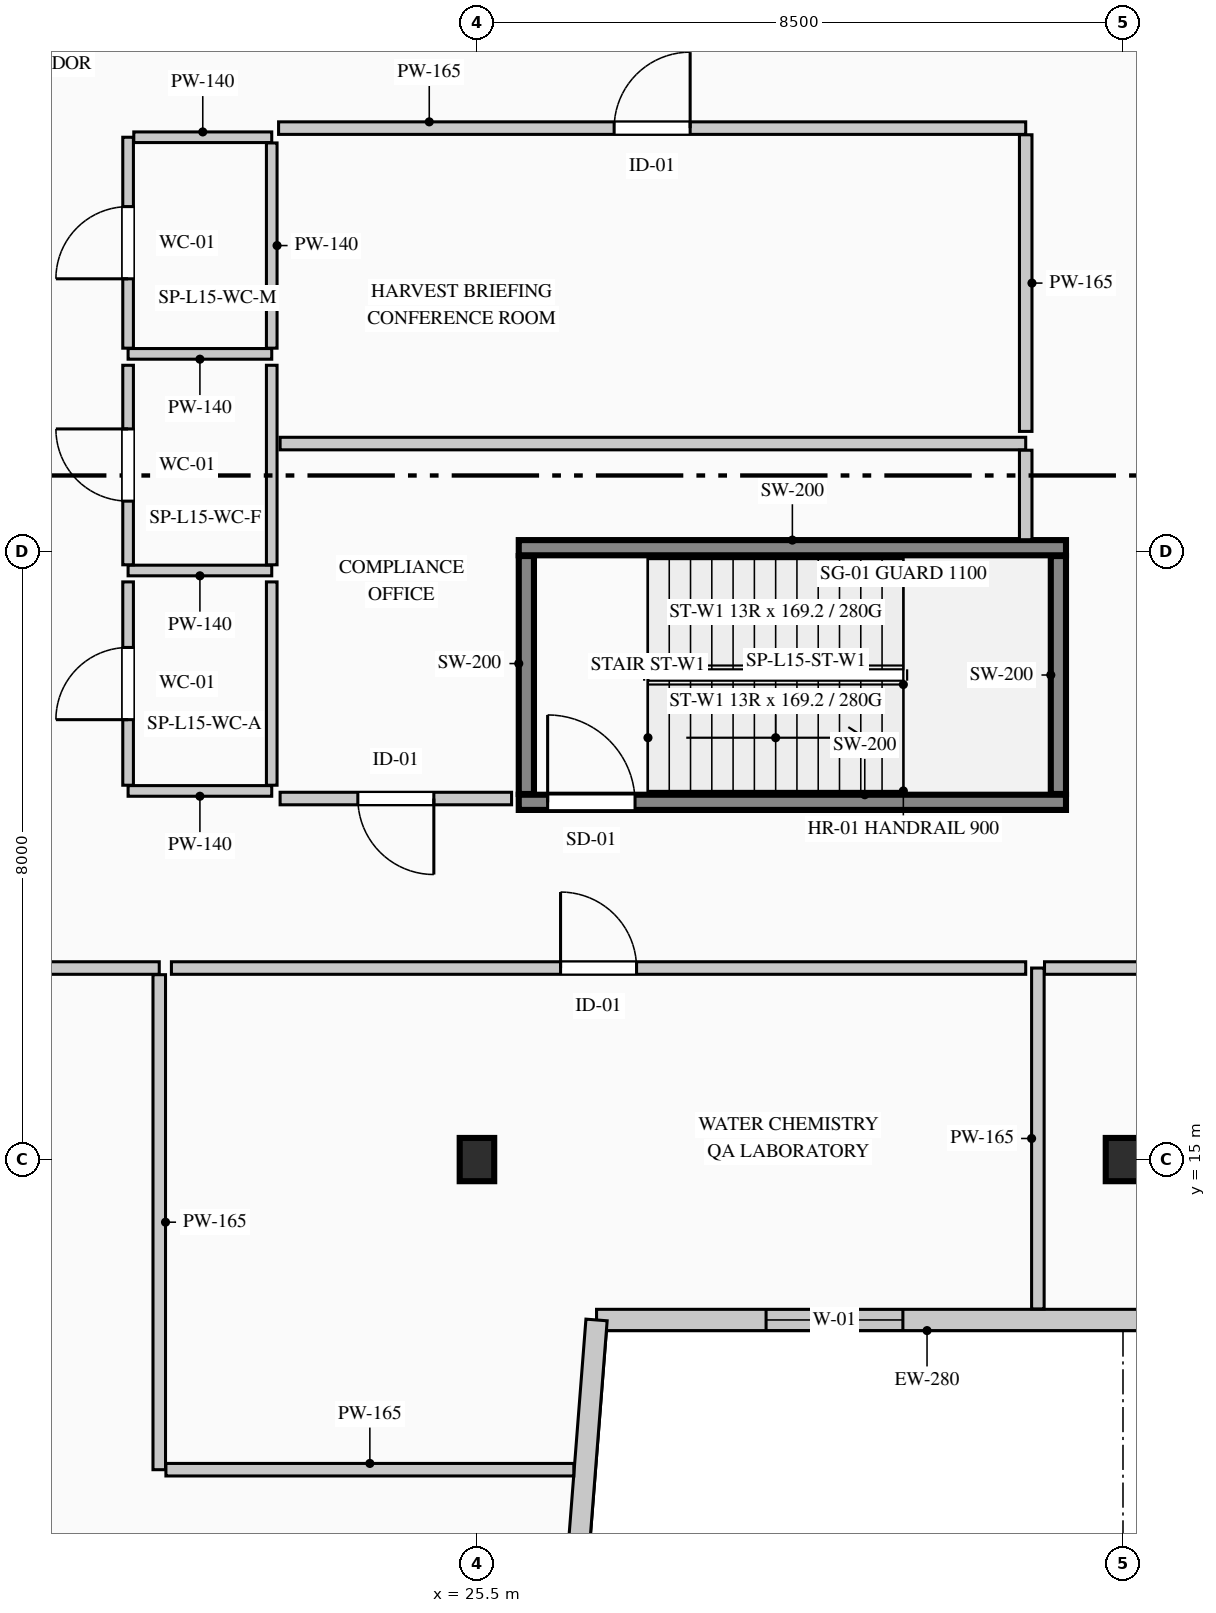
"""IFC4 building model, lengths in metres.
Left out: names, types, materials, properties, quantities, classifications, styles, units other than length and angle.
Written with IfcOpenShell. Run it as: python <this file> out.ifc"""

import sys

from ifc_helpers import new_model, si_unit, direction, frame, frame_2d, origin, origin_2d, place, context, subcontext, project, spatial, rectangle, i_section, extrude, element, fill, save


model = new_model("IFC4")
c1 = context("Model", 3, precision=1e-05, world=origin(), true_north=direction((0.0, 1.0)))
c2 = subcontext(c1, "Body", "Model", "MODEL_VIEW")
j1 = project(units=[si_unit("LENGTHUNIT", "METRE"), si_unit("PLANEANGLEUNIT", "RADIAN")], contexts=[c1])
p1 = place(None, origin())
s1 = spatial("IfcSite", under=j1, at=p1, CompositionType="ELEMENT")
p2 = place(p1, origin())
s2 = spatial("IfcBuilding", under=s1, at=p2, CompositionType="ELEMENT")
p3 = place(p2, frame((0.0, 0.0, 66.6)))
s3 = spatial("IfcBuildingStorey", under=s2, at=p3, CompositionType="ELEMENT", Elevation=66.6)
p4 = place(p3, frame((26.05, 19.7, 0.0), z_axis=(0.0, 0.0, 1.0), x_axis=(1.0, 0.0, 0.0)))
e1 = element("IfcWall", 1, at=p4, inside=s3, PredefinedType="SHEAR", context=c2, shape_type="SweptSolid", body=[
    extrude(rectangle(XDim=7.2, YDim=0.2, at=frame_2d((3.6, 0.0))), origin(), (0.0, 0.0, 1.0), 4.4),
])
p5 = place(p4, frame((0.38, 0.0, 0.0)))
e2 = element("IfcOpeningElement", 2, at=p5, cuts=e1, PredefinedType="OPENING", context=c2, shape_type="SweptSolid", body=[
    extrude(rectangle(XDim=1.15, YDim=2.2, at=frame_2d((0.575, 1.1))), frame((0.0, 0.11, 0.0), z_axis=(0.0, -1.0, 0.0), x_axis=(1.0, 0.0, 0.0)), (0.0, 0.0, 1.0), 0.22),
])
p6 = place(p3, frame((26.05, 23.05, 0.0), z_axis=(0.0, 0.0, 1.0), x_axis=(1.0, 0.0, 0.0)))
e3 = element("IfcWall", 3, at=p6, inside=s3, PredefinedType="SHEAR", context=c2, shape_type="SweptSolid", body=[
    extrude(rectangle(XDim=7.2, YDim=0.2, at=frame_2d((3.6, 0.0))), origin(), (0.0, 0.0, 1.0), 4.4),
])
for number, where, z_axis, x_axis in (
    (4, (26.15, 19.81, 0.0), (0.0, 0.0, 1.0), (0.0, 1.0, 0.0)),
    (5, (33.15, 19.81, 0.0), (0.0, 0.0, 1.0), (0.0, 1.0, 0.0)),
):
    element("IfcWall", number, at=place(p3, frame(where, z_axis=z_axis, x_axis=x_axis)), inside=s3, PredefinedType="SHEAR", context=c2, shape_type="SweptSolid", body=[
        extrude(rectangle(XDim=3.13, YDim=0.2, at=frame_2d((1.565, 0.0))), origin(), (0.0, 0.0, 1.0), 4.4),
    ])
for number, where, z_axis, x_axis in (
    (6, (25.5, 15.0, 0.0), (0.0, 0.0, 1.0), (1.0, 0.0, 0.0)),
    (7, (34.0, 15.0, 0.0), (0.0, 0.0, 1.0), (1.0, 0.0, 0.0)),
):
    element("IfcColumn", number, at=place(p3, frame(where, z_axis=z_axis, x_axis=x_axis)), inside=s3, PredefinedType="COLUMN", context=c2, shape_type="SweptSolid", body=[
        extrude(i_section(OverallWidth=0.454, OverallDepth=0.569, WebThickness=0.078, FlangeThickness=0.08, FilletRadius=0.015, at=origin_2d()), origin(), (0.0, 0.0, 1.0), 4.4),
    ])
p7 = place(p3, frame((35.77, 12.89, 0.0), z_axis=(0.0, 0.0, 1.0), x_axis=(-1.0, 0.0, 0.0)))
e8 = element("IfcWall", 8, at=p7, inside=s3, PredefinedType="STANDARD", context=c2, shape_type="SweptSolid", body=[
    extrude(rectangle(XDim=8.697, YDim=0.28, at=frame_2d((4.348, 0.0))), origin(), (0.0, 0.0, 1.0), 4.1),
])
p8 = place(p7, frame((4.666, 0.0, 0.9)))
e9 = element("IfcOpeningElement", 9, at=p8, cuts=e8, PredefinedType="OPENING", context=c2, shape_type="SweptSolid", body=[
    extrude(rectangle(XDim=1.8, YDim=2.1, at=frame_2d((0.9, 1.05))), frame((0.0, 0.15, 0.0), z_axis=(0.0, -1.0, 0.0), x_axis=(1.0, 0.0, 0.0)), (0.0, 0.0, 1.0), 0.3),
])
p9 = place(p3, frame((27.073, 12.89, 0.0), z_axis=(0.0, 0.0, 1.0), x_axis=(-0.077816860153, -0.996967670627, 0.0)))
e10 = element("IfcWall", 10, at=p9, inside=s3, PredefinedType="STANDARD", context=c2, shape_type="SweptSolid", body=[
    extrude(rectangle(XDim=10.281, YDim=0.28, at=frame_2d((5.141, 0.0))), origin(), (0.0, 0.0, 1.0), 4.1),
])
p10 = place(p3, frame((22.8, 25.6, 0.0), z_axis=(0.0, 0.0, 1.0), x_axis=(-1.0, 0.0, 0.0)))
e11 = element("IfcWall", 11, at=p10, inside=s3, PredefinedType="PARTITIONING", context=c2, shape_type="SweptSolid", body=[
    extrude(rectangle(XDim=1.89, YDim=0.14, at=frame_2d((0.945, 0.0))), origin(), (0.0, 0.0, 1.0), 4.1),
])
p11 = place(p3, frame((20.91, 25.675, 0.0), z_axis=(0.0, 0.0, 1.0), x_axis=(0.0, 1.0, 0.0)))
e12 = element("IfcWall", 12, at=p11, inside=s3, PredefinedType="PARTITIONING", context=c2, shape_type="SweptSolid", body=[
    extrude(rectangle(XDim=2.775, YDim=0.14, at=frame_2d((1.387, 0.0))), origin(), (0.0, 0.0, 1.0), 4.1),
])
p12 = place(p11, frame((0.913, 0.0, 0.0)))
e13 = element("IfcOpeningElement", 13, at=p12, cuts=e12, PredefinedType="OPENING", context=c2, shape_type="SweptSolid", body=[
    extrude(rectangle(XDim=0.95, YDim=2.15, at=frame_2d((0.475, 1.075))), frame((0.0, 0.08, 0.0), z_axis=(0.0, -1.0, 0.0), x_axis=(1.0, 0.0, 0.0)), (0.0, 0.0, 1.0), 0.16),
])
p13 = place(p3, frame((20.985, 28.45, 0.0), z_axis=(0.0, 0.0, 1.0), x_axis=(1.0, 0.0, 0.0)))
e14 = element("IfcWall", 14, at=p13, inside=s3, PredefinedType="PARTITIONING", context=c2, shape_type="SweptSolid", body=[
    extrude(rectangle(XDim=1.815, YDim=0.14, at=frame_2d((0.907, 0.0))), origin(), (0.0, 0.0, 1.0), 4.1),
])
p14 = place(p3, frame((22.8, 28.375, 0.0), z_axis=(0.0, 0.0, 1.0), x_axis=(0.0, -1.0, 0.0)))
e15 = element("IfcWall", 15, at=p14, inside=s3, PredefinedType="PARTITIONING", context=c2, shape_type="SweptSolid", body=[
    extrude(rectangle(XDim=2.7, YDim=0.14, at=frame_2d((1.35, 0.0))), origin(), (0.0, 0.0, 1.0), 3.725),
])
p15 = place(p3, frame((22.8, 22.75, 0.0), z_axis=(0.0, 0.0, 1.0), x_axis=(-1.0, 0.0, 0.0)))
e16 = element("IfcWall", 16, at=p15, inside=s3, PredefinedType="PARTITIONING", context=c2, shape_type="SweptSolid", body=[
    extrude(rectangle(XDim=1.89, YDim=0.14, at=frame_2d((0.945, 0.0))), origin(), (0.0, 0.0, 1.0), 4.1),
])
p16 = place(p3, frame((20.91, 22.825, 0.0), z_axis=(0.0, 0.0, 1.0), x_axis=(0.0, 1.0, 0.0)))
e17 = element("IfcWall", 17, at=p16, inside=s3, PredefinedType="PARTITIONING", context=c2, shape_type="SweptSolid", body=[
    extrude(rectangle(XDim=2.625, YDim=0.14, at=frame_2d((1.312, 0.0))), origin(), (0.0, 0.0, 1.0), 4.1),
])
p17 = place(p16, frame((0.837, 0.0, 0.0)))
e18 = element("IfcOpeningElement", 18, at=p17, cuts=e17, PredefinedType="OPENING", context=c2, shape_type="SweptSolid", body=[
    extrude(rectangle(XDim=0.95, YDim=2.15, at=frame_2d((0.475, 1.075))), frame((0.0, 0.08, 0.0), z_axis=(0.0, -1.0, 0.0), x_axis=(1.0, 0.0, 0.0)), (0.0, 0.0, 1.0), 0.16),
])
p18 = place(p3, frame((22.8, 25.45, 0.0), z_axis=(0.0, 0.0, 1.0), x_axis=(0.0, -1.0, 0.0)))
e19 = element("IfcWall", 19, at=p18, inside=s3, PredefinedType="PARTITIONING", context=c2, shape_type="SweptSolid", body=[
    extrude(rectangle(XDim=2.625, YDim=0.14, at=frame_2d((1.312, 0.0))), origin(), (0.0, 0.0, 1.0), 3.725),
])
p19 = place(p3, frame((22.8, 19.85, 0.0), z_axis=(0.0, 0.0, 1.0), x_axis=(-1.0, 0.0, 0.0)))
e20 = element("IfcWall", 20, at=p19, inside=s3, PredefinedType="PARTITIONING", context=c2, shape_type="SweptSolid", body=[
    extrude(rectangle(XDim=1.89, YDim=0.14, at=frame_2d((0.945, 0.0))), origin(), (0.0, 0.0, 1.0), 4.1),
])
p20 = place(p3, frame((20.91, 19.925, 0.0), z_axis=(0.0, 0.0, 1.0), x_axis=(0.0, 1.0, 0.0)))
e21 = element("IfcWall", 21, at=p20, inside=s3, PredefinedType="PARTITIONING", context=c2, shape_type="SweptSolid", body=[
    extrude(rectangle(XDim=2.675, YDim=0.14, at=frame_2d((1.337, 0.0))), origin(), (0.0, 0.0, 1.0), 4.1),
])
p21 = place(p20, frame((0.863, 0.0, 0.0)))
e22 = element("IfcOpeningElement", 22, at=p21, cuts=e21, PredefinedType="OPENING", context=c2, shape_type="SweptSolid", body=[
    extrude(rectangle(XDim=0.95, YDim=2.15, at=frame_2d((0.475, 1.075))), frame((0.0, 0.08, 0.0), z_axis=(0.0, -1.0, 0.0), x_axis=(1.0, 0.0, 0.0)), (0.0, 0.0, 1.0), 0.16),
])
p22 = place(p3, frame((22.8, 22.6, 0.0), z_axis=(0.0, 0.0, 1.0), x_axis=(0.0, -1.0, 0.0)))
e23 = element("IfcWall", 23, at=p22, inside=s3, PredefinedType="PARTITIONING", context=c2, shape_type="SweptSolid", body=[
    extrude(rectangle(XDim=2.675, YDim=0.14, at=frame_2d((1.337, 0.0))), origin(), (0.0, 0.0, 1.0), 3.725),
])
p23 = place(p3, frame((11.88, 17.52, 0.0), z_axis=(0.0, 0.0, 1.0), x_axis=(1.0, 0.0, 0.0)))
e24 = element("IfcWall", 24, at=p23, inside=s3, PredefinedType="PARTITIONING", context=c2, shape_type="SweptSolid", body=[
    extrude(rectangle(XDim=9.44, YDim=0.165, at=frame_2d((4.72, 0.0))), origin(), (0.0, 0.0, 1.0), 4.1),
])
p24 = place(p23, frame((4.22, 0.0, 0.0)))
e25 = element("IfcOpeningElement", 25, at=p24, cuts=e24, PredefinedType="OPENING", context=c2, shape_type="SweptSolid", body=[
    extrude(rectangle(XDim=1.0, YDim=2.15, at=frame_2d((0.5, 1.075))), frame((0.0, 0.093, 0.0), z_axis=(0.0, -1.0, 0.0), x_axis=(1.0, 0.0, 0.0)), (0.0, 0.0, 1.0), 0.185),
])
p25 = place(p3, frame((21.32, 17.433, 0.0), z_axis=(0.0, 0.0, 1.0), x_axis=(0.0, -1.0, 0.0)))
e26 = element("IfcWall", 26, at=p25, inside=s3, PredefinedType="PARTITIONING", context=c2, shape_type="SweptSolid", body=[
    extrude(rectangle(XDim=6.513, YDim=0.165, at=frame_2d((3.256, 0.0))), origin(), (0.0, 0.0, 1.0), 3.725),
])
p26 = place(p3, frame((21.407, 10.92, 0.0), z_axis=(0.0, 0.0, 1.0), x_axis=(1.0, 0.0, 0.0)))
e27 = element("IfcWall", 27, at=p26, inside=s3, PredefinedType="PARTITIONING", context=c2, shape_type="SweptSolid", body=[
    extrude(rectangle(XDim=5.367, YDim=0.165, at=frame_2d((2.684, 0.0))), origin(), (0.0, 0.0, 1.0), 4.1),
])
p27 = place(p3, frame((32.88, 13.035, 0.0), z_axis=(0.0, 0.0, 1.0), x_axis=(0.0, 1.0, 0.0)))
e28 = element("IfcWall", 28, at=p27, inside=s3, PredefinedType="PARTITIONING", context=c2, shape_type="SweptSolid", body=[
    extrude(rectangle(XDim=4.485, YDim=0.165, at=frame_2d((2.243, 0.0))), origin(), (0.0, 0.0, 1.0), 4.1),
])
p28 = place(p3, frame((32.968, 17.52, 0.0), z_axis=(0.0, 0.0, 1.0), x_axis=(1.0, 0.0, 0.0)))
e29 = element("IfcWall", 29, at=p28, inside=s3, PredefinedType="PARTITIONING", context=c2, shape_type="SweptSolid", body=[
    extrude(rectangle(XDim=12.012, YDim=0.165, at=frame_2d((6.006, 0.0))), origin(), (0.0, 0.0, 1.0), 3.885),
])
p29 = place(p28, frame((5.506, 0.0, 0.0)))
e30 = element("IfcOpeningElement", 30, at=p29, cuts=e29, PredefinedType="OPENING", context=c2, shape_type="SweptSolid", body=[
    extrude(rectangle(XDim=1.0, YDim=2.15, at=frame_2d((0.5, 1.075))), frame((0.0, 0.093, 0.0), z_axis=(0.0, -1.0, 0.0), x_axis=(1.0, 0.0, 0.0)), (0.0, 0.0, 1.0), 0.185),
])
p30 = place(p3, frame((21.48, 17.52, 0.0), z_axis=(0.0, 0.0, 1.0), x_axis=(1.0, 0.0, 0.0)))
e31 = element("IfcWall", 31, at=p30, inside=s3, PredefinedType="PARTITIONING", context=c2, shape_type="SweptSolid", body=[
    extrude(rectangle(XDim=11.24, YDim=0.165, at=frame_2d((5.62, 0.0))), origin(), (0.0, 0.0, 1.0), 3.885),
])
p31 = place(p30, frame((5.12, 0.0, 0.0)))
e32 = element("IfcOpeningElement", 32, at=p31, cuts=e31, PredefinedType="OPENING", context=c2, shape_type="SweptSolid", body=[
    extrude(rectangle(XDim=1.0, YDim=2.15, at=frame_2d((0.5, 1.075))), frame((0.0, 0.093, 0.0), z_axis=(0.0, -1.0, 0.0), x_axis=(1.0, 0.0, 0.0)), (0.0, 0.0, 1.0), 0.185),
])
p32 = place(p3, frame((25.956, 19.75, 0.0), z_axis=(0.0, 0.0, 1.0), x_axis=(-1.0, 0.0, 0.0)))
e33 = element("IfcWall", 33, at=p32, inside=s3, PredefinedType="PARTITIONING", context=c2, shape_type="SweptSolid", body=[
    extrude(rectangle(XDim=3.046, YDim=0.165, at=frame_2d((1.523, 0.0))), origin(), (0.0, 0.0, 1.0), 4.1),
])
p33 = place(p32, frame((1.023, 0.0, 0.0)))
e34 = element("IfcOpeningElement", 34, at=p33, cuts=e33, PredefinedType="OPENING", context=c2, shape_type="SweptSolid", body=[
    extrude(rectangle(XDim=1.0, YDim=2.15, at=frame_2d((0.5, 1.075))), frame((0.0, 0.093, 0.0), z_axis=(0.0, -1.0, 0.0), x_axis=(1.0, 0.0, 0.0)), (0.0, 0.0, 1.0), 0.185),
])
p34 = place(p3, frame((22.91, 24.42, 0.0), z_axis=(0.0, 0.0, 1.0), x_axis=(1.0, 0.0, 0.0)))
e35 = element("IfcWall", 35, at=p34, inside=s3, PredefinedType="PARTITIONING", context=c2, shape_type="SweptSolid", body=[
    extrude(rectangle(XDim=9.81, YDim=0.165, at=frame_2d((4.905, 0.0))), origin(), (0.0, 0.0, 1.0), 3.725),
])
p35 = place(p3, frame((32.72, 24.333, 0.0), z_axis=(0.0, 0.0, 1.0), x_axis=(0.0, -1.0, 0.0)))
e36 = element("IfcWall", 36, at=p35, inside=s3, PredefinedType="PARTITIONING", context=c2, shape_type="SweptSolid", body=[
    extrude(rectangle(XDim=1.177, YDim=0.165, at=frame_2d((0.589, 0.0))), origin(), (0.0, 0.0, 1.0), 4.1),
])
p36 = place(p3, frame((22.89, 28.57, 0.0), z_axis=(0.0, 0.0, 1.0), x_axis=(1.0, 0.0, 0.0)))
e37 = element("IfcWall", 37, at=p36, inside=s3, PredefinedType="PARTITIONING", context=c2, shape_type="SweptSolid", body=[
    extrude(rectangle(XDim=9.83, YDim=0.165, at=frame_2d((4.915, 0.0))), origin(), (0.0, 0.0, 1.0), 3.885),
])
p37 = place(p36, frame((4.415, 0.0, 0.0)))
e38 = element("IfcOpeningElement", 38, at=p37, cuts=e37, PredefinedType="OPENING", context=c2, shape_type="SweptSolid", body=[
    extrude(rectangle(XDim=1.0, YDim=2.15, at=frame_2d((0.5, 1.075))), frame((0.0, 0.093, 0.0), z_axis=(0.0, -1.0, 0.0), x_axis=(1.0, 0.0, 0.0)), (0.0, 0.0, 1.0), 0.185),
])
p38 = place(p3, frame((32.72, 28.482, 0.0), z_axis=(0.0, 0.0, 1.0), x_axis=(0.0, -1.0, 0.0)))
e39 = element("IfcWall", 39, at=p38, inside=s3, PredefinedType="PARTITIONING", context=c2, shape_type="SweptSolid", body=[
    extrude(rectangle(XDim=3.902, YDim=0.165, at=frame_2d((1.951, 0.0))), origin(), (0.0, 0.0, 1.0), 4.1),
])
p39 = place(p8, origin())
e40 = element("IfcWindow", 40, at=p39, inside=s3, PartitioningType="SINGLE_PANEL", PredefinedType="WINDOW", context=c2, shape_type="SweptSolid", body=[
    extrude(rectangle(XDim=1.8, YDim=2.1, at=frame_2d((0.9, 1.05))), frame((0.0, 0.03, 0.0), z_axis=(0.0, -1.0, 0.0), x_axis=(1.0, 0.0, 0.0)), (0.0, 0.0, 1.0), 0.06),
])
fill(e9, e40)
p40 = place(p5, origin())
e41 = element("IfcDoor", 41, at=p40, inside=s3, OperationType="SINGLE_SWING_LEFT", PredefinedType="DOOR", context=c2, shape_type="SweptSolid", body=[
    extrude(rectangle(XDim=1.15, YDim=2.2, at=frame_2d((0.575, 1.1))), frame((0.0, 0.025, 0.0), z_axis=(0.0, -1.0, 0.0), x_axis=(1.0, 0.0, 0.0)), (0.0, 0.0, 1.0), 0.05),
])
fill(e2, e41)
p41 = place(p12, origin())
e42 = element("IfcDoor", 42, at=p41, inside=s3, OperationType="SINGLE_SWING_LEFT", PredefinedType="DOOR", context=c2, shape_type="SweptSolid", body=[
    extrude(rectangle(XDim=0.95, YDim=2.15, at=frame_2d((0.475, 1.075))), frame((0.0, 0.025, 0.0), z_axis=(0.0, -1.0, 0.0), x_axis=(1.0, 0.0, 0.0)), (0.0, 0.0, 1.0), 0.05),
])
fill(e13, e42)
p42 = place(p17, origin())
e43 = element("IfcDoor", 43, at=p42, inside=s3, OperationType="SINGLE_SWING_RIGHT", PredefinedType="DOOR", context=c2, shape_type="SweptSolid", body=[
    extrude(rectangle(XDim=0.95, YDim=2.15, at=frame_2d((0.475, 1.075))), frame((0.0, 0.025, 0.0), z_axis=(0.0, -1.0, 0.0), x_axis=(1.0, 0.0, 0.0)), (0.0, 0.0, 1.0), 0.05),
])
fill(e18, e43)
p43 = place(p21, origin())
e44 = element("IfcDoor", 44, at=p43, inside=s3, OperationType="SINGLE_SWING_LEFT", PredefinedType="DOOR", context=c2, shape_type="SweptSolid", body=[
    extrude(rectangle(XDim=0.95, YDim=2.15, at=frame_2d((0.475, 1.075))), frame((0.0, 0.025, 0.0), z_axis=(0.0, -1.0, 0.0), x_axis=(1.0, 0.0, 0.0)), (0.0, 0.0, 1.0), 0.05),
])
fill(e22, e44)
p44 = place(p31, origin())
e45 = element("IfcDoor", 45, at=p44, inside=s3, OperationType="SINGLE_SWING_LEFT", PredefinedType="DOOR", context=c2, shape_type="SweptSolid", body=[
    extrude(rectangle(XDim=1.0, YDim=2.15, at=frame_2d((0.5, 1.075))), frame((0.0, 0.025, 0.0), z_axis=(0.0, -1.0, 0.0), x_axis=(1.0, 0.0, 0.0)), (0.0, 0.0, 1.0), 0.05),
])
fill(e32, e45)
p45 = place(p33, origin())
e46 = element("IfcDoor", 46, at=p45, inside=s3, OperationType="SINGLE_SWING_LEFT", PredefinedType="DOOR", context=c2, shape_type="SweptSolid", body=[
    extrude(rectangle(XDim=1.0, YDim=2.15, at=frame_2d((0.5, 1.075))), frame((0.0, 0.025, 0.0), z_axis=(0.0, -1.0, 0.0), x_axis=(1.0, 0.0, 0.0)), (0.0, 0.0, 1.0), 0.05),
])
fill(e34, e46)
p46 = place(p37, origin())
e47 = element("IfcDoor", 47, at=p46, inside=s3, OperationType="SINGLE_SWING_RIGHT", PredefinedType="DOOR", context=c2, shape_type="SweptSolid", body=[
    extrude(rectangle(XDim=1.0, YDim=2.15, at=frame_2d((0.5, 1.075))), frame((0.0, 0.025, 0.0), z_axis=(0.0, -1.0, 0.0), x_axis=(1.0, 0.0, 0.0)), (0.0, 0.0, 1.0), 0.05),
])
fill(e38, e47)
save(model, sys.argv[1])
